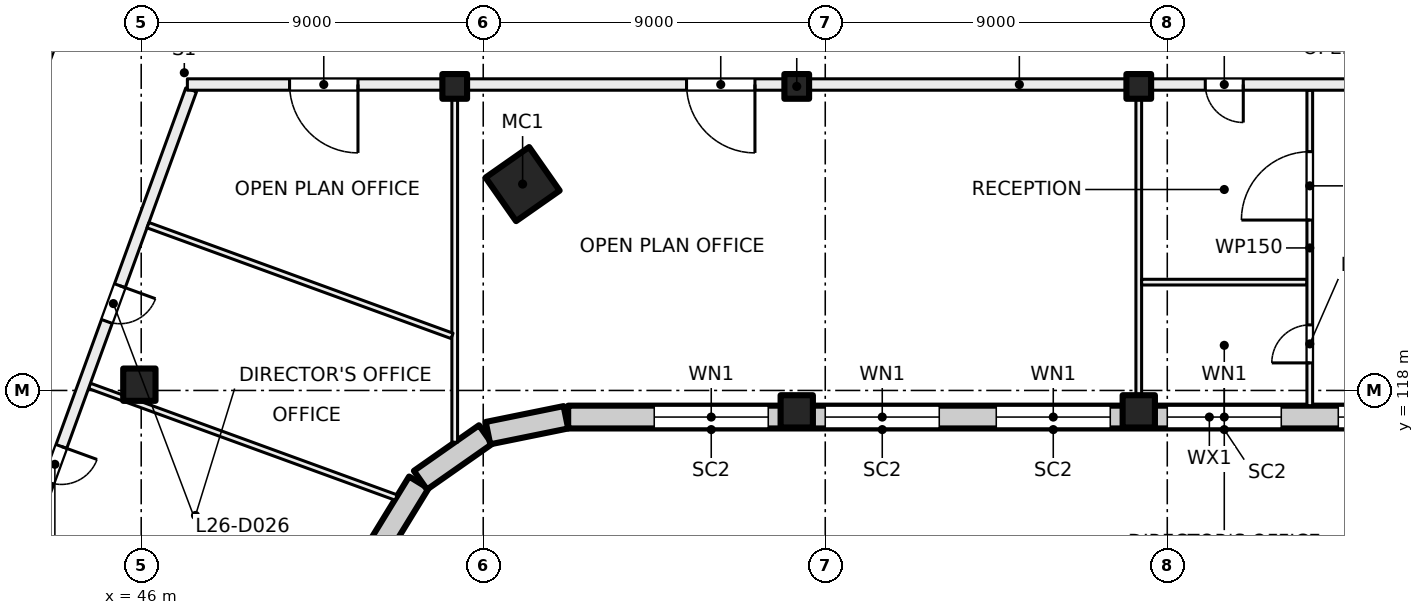
"""IFC4 building model, lengths in metres.
Left out: names, types, materials, properties, quantities, classifications, styles, units other than length and angle.
Written with IfcOpenShell. Run it as: python <this file> out.ifc"""

import sys

from ifc_helpers import new_model, si_unit, direction, frame, frame_2d, origin, origin_2d, place, context, subcontext, project, spatial, rectangle, hollow_rectangle, extrude, element, fill, save


model = new_model("IFC4")
c1 = context("Model", 3, precision=1e-05, world=origin(), true_north=direction((0.0, 1.0)))
c2 = subcontext(c1, "Body", "Model", "MODEL_VIEW")
j1 = project(units=[si_unit("LENGTHUNIT", "METRE"), si_unit("PLANEANGLEUNIT", "RADIAN")], contexts=[c1])
p1 = place(None, origin())
s1 = spatial("IfcSite", under=j1, at=p1, CompositionType="ELEMENT")
p2 = place(p1, origin())
s2 = spatial("IfcBuilding", under=s1, at=p2, CompositionType="ELEMENT")
p3 = place(p2, frame((0.0, 0.0, 113.0)))
s3 = spatial("IfcBuildingStorey", under=s2, at=p3, CompositionType="ELEMENT", Elevation=113.0)
p4 = place(p3, frame((56.036, 123.43, 0.0), z_axis=(0.0, 0.0, 1.0), x_axis=(0.573576436351, -0.819152044289, 0.0)))
e1 = element("IfcColumn", 1, at=p4, inside=s3, PredefinedType="COLUMN", context=c2, shape_type="SweptSolid", body=[
    extrude(hollow_rectangle(XDim=1.4, YDim=1.4, WallThickness=0.04, at=origin_2d()), origin(), (0.0, 0.0, 1.0), 4.0),
])
for number, where, z_axis, x_axis in (
    (2, (54.25, 126.0, 0.0), (0.0, 0.0, 1.0), (1.0, 0.0, 0.0)),
    (3, (63.25, 126.0, 0.0), (0.0, 0.0, 1.0), (1.0, 0.0, 0.0)),
    (4, (72.25, 126.0, 0.0), (0.0, 0.0, 1.0), (1.0, 0.0, 0.0)),
):
    element("IfcColumn", number, at=place(p3, frame(where, z_axis=z_axis, x_axis=x_axis)), inside=s3, PredefinedType="COLUMN", context=c2, shape_type="SweptSolid", body=[
        extrude(rectangle(XDim=0.65, YDim=0.65, at=origin_2d()), origin(), (0.0, 0.0, 1.0), 4.0),
    ])
for number, where, z_axis, x_axis in (
    (5, (45.952, 118.152, 0.0), (0.0, 0.0, 1.0), (1.0, 0.0, 0.0)),
    (6, (63.25, 117.45, 0.0), (0.0, 0.0, 1.0), (1.0, 0.0, 0.0)),
    (7, (72.25, 117.45, 0.0), (0.0, 0.0, 1.0), (1.0, 0.0, 0.0)),
):
    element("IfcColumn", number, at=place(p3, frame(where, z_axis=z_axis, x_axis=x_axis)), inside=s3, PredefinedType="COLUMN", context=c2, shape_type="SweptSolid", body=[
        extrude(rectangle(XDim=0.85, YDim=0.85, at=origin_2d()), origin(), (0.0, 0.0, 1.0), 4.0),
    ])
p5 = place(p3, frame((53.305, 115.578, 0.0), z_axis=(0.0, 0.0, 1.0), x_axis=(-0.522402266438, -0.852699168535, 0.0)))
e8 = element("IfcWall", 8, at=p5, inside=s3, PredefinedType="SOLIDWALL", context=c2, shape_type="SweptSolid", body=[
    extrude(rectangle(XDim=2.042, YDim=0.6, at=frame_2d((1.021, 0.0))), origin(), (0.0, 0.0, 1.0), 3.625),
])
for number, where, z_axis, x_axis in (
    (9, (55.062, 116.839, 0.0), (0.0, 0.0, 1.0), (-0.819, -0.574, 0.0)),
    (10, (57.175, 117.294, 0.0), (0.0, 0.0, 1.0), (-0.98, -0.199, 0.0)),
):
    element("IfcWall", number, at=place(p3, frame(where, z_axis=z_axis, x_axis=x_axis)), inside=s3, PredefinedType="SOLIDWALL", context=c2, shape_type="SweptSolid", body=[
        extrude(rectangle(XDim=2.092, YDim=0.6, at=frame_2d((1.046, 0.0))), origin(), (0.0, 0.0, 1.0), 3.625),
    ])
p6 = place(p3, frame((90.98, 117.3, 0.0), z_axis=(0.0, 0.0, 1.0), x_axis=(-1.0, 0.0, 0.0)))
e11 = element("IfcWall", 11, at=p6, inside=s3, PredefinedType="SOLIDWALL", context=c2, shape_type="SweptSolid", body=[
    extrude(rectangle(XDim=33.745, YDim=0.6, at=frame_2d((16.873, 0.0))), origin(), (0.0, 0.0, 1.0), 3.625),
])
p7 = place(p6, frame((1.48, 0.0, 0.9)))
e12 = element("IfcOpeningElement", 12, at=p7, cuts=e11, PredefinedType="OPENING", context=c2, shape_type="SweptSolid", body=[
    extrude(rectangle(XDim=3.0, YDim=2.4, at=frame_2d((1.5, 1.2))), frame((0.0, 0.31, 0.0), z_axis=(0.0, -1.0, 0.0), x_axis=(1.0, 0.0, 0.0)), (0.0, 0.0, 1.0), 0.62),
])
p8 = place(p6, frame((5.98, 0.0, 0.9)))
e13 = element("IfcOpeningElement", 13, at=p8, cuts=e11, PredefinedType="OPENING", context=c2, shape_type="SweptSolid", body=[
    extrude(rectangle(XDim=3.0, YDim=2.4, at=frame_2d((1.5, 1.2))), frame((0.0, 0.31, 0.0), z_axis=(0.0, -1.0, 0.0), x_axis=(1.0, 0.0, 0.0)), (0.0, 0.0, 1.0), 0.62),
])
p9 = place(p6, frame((10.48, 0.0, 0.9)))
e14 = element("IfcOpeningElement", 14, at=p9, cuts=e11, PredefinedType="OPENING", context=c2, shape_type="SweptSolid", body=[
    extrude(rectangle(XDim=3.0, YDim=2.4, at=frame_2d((1.5, 1.2))), frame((0.0, 0.31, 0.0), z_axis=(0.0, -1.0, 0.0), x_axis=(1.0, 0.0, 0.0)), (0.0, 0.0, 1.0), 0.62),
])
p10 = place(p6, frame((14.98, 0.0, 0.9)))
e15 = element("IfcOpeningElement", 15, at=p10, cuts=e11, PredefinedType="OPENING", context=c2, shape_type="SweptSolid", body=[
    extrude(rectangle(XDim=3.0, YDim=2.4, at=frame_2d((1.5, 1.2))), frame((0.0, 0.31, 0.0), z_axis=(0.0, -1.0, 0.0), x_axis=(1.0, 0.0, 0.0)), (0.0, 0.0, 1.0), 0.62),
])
p11 = place(p6, frame((19.48, 0.0, 0.9)))
e16 = element("IfcOpeningElement", 16, at=p11, cuts=e11, PredefinedType="OPENING", context=c2, shape_type="SweptSolid", body=[
    extrude(rectangle(XDim=3.0, YDim=2.4, at=frame_2d((1.5, 1.2))), frame((0.0, 0.31, 0.0), z_axis=(0.0, -1.0, 0.0), x_axis=(1.0, 0.0, 0.0)), (0.0, 0.0, 1.0), 0.62),
])
p12 = place(p6, frame((23.98, 0.0, 0.9)))
e17 = element("IfcOpeningElement", 17, at=p12, cuts=e11, PredefinedType="OPENING", context=c2, shape_type="SweptSolid", body=[
    extrude(rectangle(XDim=3.0, YDim=2.4, at=frame_2d((1.5, 1.2))), frame((0.0, 0.31, 0.0), z_axis=(0.0, -1.0, 0.0), x_axis=(1.0, 0.0, 0.0)), (0.0, 0.0, 1.0), 0.62),
])
p13 = place(p6, frame((28.48, 0.0, 0.9)))
e18 = element("IfcOpeningElement", 18, at=p13, cuts=e11, PredefinedType="OPENING", context=c2, shape_type="SweptSolid", body=[
    extrude(rectangle(XDim=3.0, YDim=2.4, at=frame_2d((1.5, 1.2))), frame((0.0, 0.31, 0.0), z_axis=(0.0, -1.0, 0.0), x_axis=(1.0, 0.0, 0.0)), (0.0, 0.0, 1.0), 0.62),
])
p14 = place(p3, frame((32.881, 97.657, 0.0), z_axis=(0.0, 0.0, 1.0), x_axis=(0.342017360004, 0.939693633828, 0.0)))
e19 = element("IfcWall", 19, at=p14, inside=s3, PredefinedType="PARTITIONING", context=c2, shape_type="SweptSolid", body=[
    extrude(rectangle(XDim=34.516, YDim=0.3, at=frame_2d((17.258, 0.0))), origin(), (0.0, 0.0, 1.0), 3.625),
])
p15 = place(p14, frame((2.025, 0.0, 0.0)))
e20 = element("IfcOpeningElement", 20, at=p15, cuts=e19, PredefinedType="OPENING", context=c2, shape_type="SweptSolid", body=[
    extrude(rectangle(XDim=1.2, YDim=2.1, at=frame_2d((0.6, 1.05))), frame((0.0, 0.16, 0.0), z_axis=(0.0, -1.0, 0.0), x_axis=(1.0, 0.0, 0.0)), (0.0, 0.0, 1.0), 0.32),
])
p16 = place(p14, frame((7.0, 0.0, 0.0)))
e21 = element("IfcOpeningElement", 21, at=p16, cuts=e19, PredefinedType="OPENING", context=c2, shape_type="SweptSolid", body=[
    extrude(rectangle(XDim=1.0, YDim=2.1, at=frame_2d((0.5, 1.05))), frame((0.0, 0.16, 0.0), z_axis=(0.0, -1.0, 0.0), x_axis=(1.0, 0.0, 0.0)), (0.0, 0.0, 1.0), 0.32),
])
p17 = place(p14, frame((11.5, 0.0, 0.0)))
e22 = element("IfcOpeningElement", 22, at=p17, cuts=e19, PredefinedType="OPENING", context=c2, shape_type="SweptSolid", body=[
    extrude(rectangle(XDim=1.0, YDim=2.1, at=frame_2d((0.5, 1.05))), frame((0.0, 0.16, 0.0), z_axis=(0.0, -1.0, 0.0), x_axis=(1.0, 0.0, 0.0)), (0.0, 0.0, 1.0), 0.32),
])
p18 = place(p14, frame((16.0, 0.0, 0.0)))
e23 = element("IfcOpeningElement", 23, at=p18, cuts=e19, PredefinedType="OPENING", context=c2, shape_type="SweptSolid", body=[
    extrude(rectangle(XDim=1.0, YDim=2.1, at=frame_2d((0.5, 1.05))), frame((0.0, 0.16, 0.0), z_axis=(0.0, -1.0, 0.0), x_axis=(1.0, 0.0, 0.0)), (0.0, 0.0, 1.0), 0.32),
])
p19 = place(p14, frame((20.5, 0.0, 0.0)))
e24 = element("IfcOpeningElement", 24, at=p19, cuts=e19, PredefinedType="OPENING", context=c2, shape_type="SweptSolid", body=[
    extrude(rectangle(XDim=1.0, YDim=2.1, at=frame_2d((0.5, 1.05))), frame((0.0, 0.16, 0.0), z_axis=(0.0, -1.0, 0.0), x_axis=(1.0, 0.0, 0.0)), (0.0, 0.0, 1.0), 0.32),
])
p20 = place(p14, frame((25.0, 0.0, 0.0)))
e25 = element("IfcOpeningElement", 25, at=p20, cuts=e19, PredefinedType="OPENING", context=c2, shape_type="SweptSolid", body=[
    extrude(rectangle(XDim=1.0, YDim=2.1, at=frame_2d((0.5, 1.05))), frame((0.0, 0.16, 0.0), z_axis=(0.0, -1.0, 0.0), x_axis=(1.0, 0.0, 0.0)), (0.0, 0.0, 1.0), 0.32),
])
p21 = place(p14, frame((29.779, 0.0, 0.0)))
e26 = element("IfcOpeningElement", 26, at=p21, cuts=e19, PredefinedType="OPENING", context=c2, shape_type="SweptSolid", body=[
    extrude(rectangle(XDim=1.8, YDim=2.1, at=frame_2d((0.9, 1.05))), frame((0.0, 0.16, 0.0), z_axis=(0.0, -1.0, 0.0), x_axis=(1.0, 0.0, 0.0)), (0.0, 0.0, 1.0), 0.32),
])
p22 = place(p3, frame((44.639, 118.12, 0.0), z_axis=(0.0, 0.0, 1.0), x_axis=(0.939669707102, -0.342083091593, 0.0)))
e27 = element("IfcWall", 27, at=p22, inside=s3, PredefinedType="PARTITIONING", context=c2, shape_type="SweptSolid", body=[
    extrude(rectangle(XDim=8.589, YDim=0.15, at=frame_2d((4.295, 0.0))), origin(), (0.0, 0.0, 1.0), 3.625),
])
p23 = place(p3, frame((47.314, 125.909, 0.0), z_axis=(0.0, 0.0, 1.0), x_axis=(-0.342010770371, -0.939696032209, 0.0)))
e28 = element("IfcWall", 28, at=p23, inside=s3, PredefinedType="PARTITIONING", context=c2, shape_type="SweptSolid", body=[
    extrude(rectangle(XDim=31.485, YDim=0.3, at=frame_2d((15.742, 0.0))), origin(), (0.0, 0.0, 1.0), 3.625),
])
p24 = place(p23, frame((28.259, 0.0, 0.0)))
e29 = element("IfcOpeningElement", 29, at=p24, cuts=e28, PredefinedType="OPENING", context=c2, shape_type="SweptSolid", body=[
    extrude(rectangle(XDim=1.2, YDim=2.1, at=frame_2d((0.6, 1.05))), frame((0.0, 0.16, 0.0), z_axis=(0.0, -1.0, 0.0), x_axis=(1.0, 0.0, 0.0)), (0.0, 0.0, 1.0), 0.32),
])
p25 = place(p23, frame((18.584, 0.0, 0.0)))
e30 = element("IfcOpeningElement", 30, at=p25, cuts=e28, PredefinedType="OPENING", context=c2, shape_type="SweptSolid", body=[
    extrude(rectangle(XDim=1.8, YDim=2.1, at=frame_2d((0.9, 1.05))), frame((0.0, 0.16, 0.0), z_axis=(0.0, -1.0, 0.0), x_axis=(1.0, 0.0, 0.0)), (0.0, 0.0, 1.0), 0.32),
])
p26 = place(p23, frame((9.985, 0.0, 0.0)))
e31 = element("IfcOpeningElement", 31, at=p26, cuts=e28, PredefinedType="OPENING", context=c2, shape_type="SweptSolid", body=[
    extrude(rectangle(XDim=1.0, YDim=2.1, at=frame_2d((0.5, 1.05))), frame((0.0, 0.16, 0.0), z_axis=(0.0, -1.0, 0.0), x_axis=(1.0, 0.0, 0.0)), (0.0, 0.0, 1.0), 0.32),
])
p27 = place(p23, frame((5.484, 0.0, 0.0)))
e32 = element("IfcOpeningElement", 32, at=p27, cuts=e28, PredefinedType="OPENING", context=c2, shape_type="SweptSolid", body=[
    extrude(rectangle(XDim=1.0, YDim=2.1, at=frame_2d((0.5, 1.05))), frame((0.0, 0.16, 0.0), z_axis=(0.0, -1.0, 0.0), x_axis=(1.0, 0.0, 0.0)), (0.0, 0.0, 1.0), 0.32),
])
p28 = place(p3, frame((54.25, 116.637, 0.0), z_axis=(0.0, 0.0, 1.0), x_axis=(0.0, 1.0, 0.0)))
e33 = element("IfcWall", 33, at=p28, inside=s3, PredefinedType="PARTITIONING", context=c2, shape_type="SweptSolid", body=[
    extrude(rectangle(XDim=9.263, YDim=0.15, at=frame_2d((4.631, 0.0))), origin(), (0.0, 0.0, 1.0), 3.625),
])
p29 = place(p3, frame((54.18, 119.436, 0.0), z_axis=(0.0, 0.0, 1.0), x_axis=(-0.939669476286, 0.342083725624, 0.0)))
e34 = element("IfcWall", 34, at=p29, inside=s3, PredefinedType="PARTITIONING", context=c2, shape_type="SweptSolid", body=[
    extrude(rectangle(XDim=8.516, YDim=0.15, at=frame_2d((4.258, 0.0))), origin(), (0.0, 0.0, 1.0), 3.625),
])
p30 = place(p3, frame((72.25, 117.6, 0.0), z_axis=(0.0, 0.0, 1.0), x_axis=(0.0, 1.0, 0.0)))
e35 = element("IfcWall", 35, at=p30, inside=s3, PredefinedType="PARTITIONING", context=c2, shape_type="SweptSolid", body=[
    extrude(rectangle(XDim=8.3, YDim=0.15, at=frame_2d((4.15, 0.0))), origin(), (0.0, 0.0, 1.0), 3.625),
])
p31 = place(p3, frame((72.325, 120.85, 0.0), z_axis=(0.0, 0.0, 1.0), x_axis=(1.0, 0.0, 0.0)))
e36 = element("IfcWall", 36, at=p31, inside=s3, PredefinedType="PARTITIONING", context=c2, shape_type="SweptSolid", body=[
    extrude(rectangle(XDim=4.35, YDim=0.15, at=frame_2d((2.175, 0.0))), origin(), (0.0, 0.0, 1.0), 3.625),
])
p32 = place(p3, frame((76.75, 117.6, 0.0), z_axis=(0.0, 0.0, 1.0), x_axis=(0.0, 1.0, 0.0)))
e37 = element("IfcWall", 37, at=p32, inside=s3, PredefinedType="PARTITIONING", context=c2, shape_type="SweptSolid", body=[
    extrude(rectangle(XDim=8.3, YDim=0.15, at=frame_2d((4.15, 0.0))), origin(), (0.0, 0.0, 1.0), 3.625),
])
p33 = place(p32, frame((1.125, 0.0, 0.0)))
e38 = element("IfcOpeningElement", 38, at=p33, cuts=e37, PredefinedType="OPENING", context=c2, shape_type="SweptSolid", body=[
    extrude(rectangle(XDim=1.0, YDim=2.1, at=frame_2d((0.5, 1.05))), frame((0.0, 0.085, 0.0), z_axis=(0.0, -1.0, 0.0), x_axis=(1.0, 0.0, 0.0)), (0.0, 0.0, 1.0), 0.17),
])
p34 = place(p32, frame((4.884, 0.0, 0.0)))
e39 = element("IfcOpeningElement", 39, at=p34, cuts=e37, PredefinedType="OPENING", context=c2, shape_type="SweptSolid", body=[
    extrude(rectangle(XDim=1.8, YDim=2.1, at=frame_2d((0.9, 1.05))), frame((0.0, 0.085, 0.0), z_axis=(0.0, -1.0, 0.0), x_axis=(1.0, 0.0, 0.0)), (0.0, 0.0, 1.0), 0.17),
])
p35 = place(p3, frame((91.0, 126.05, 0.0), z_axis=(0.0, 0.0, 1.0), x_axis=(-1.0, 0.0, 0.0)))
e40 = element("IfcWall", 40, at=p35, inside=s3, PredefinedType="PARTITIONING", context=c2, shape_type="SweptSolid", body=[
    extrude(rectangle(XDim=43.785, YDim=0.3, at=frame_2d((21.893, 0.0))), origin(), (0.0, 0.0, 1.0), 3.625),
])
p36 = place(p35, frame((2.025, 0.0, 0.0)))
e41 = element("IfcOpeningElement", 41, at=p36, cuts=e40, PredefinedType="OPENING", context=c2, shape_type="SweptSolid", body=[
    extrude(rectangle(XDim=1.2, YDim=2.1, at=frame_2d((0.6, 1.05))), frame((0.0, 0.16, 0.0), z_axis=(0.0, -1.0, 0.0), x_axis=(1.0, 0.0, 0.0)), (0.0, 0.0, 1.0), 0.32),
])
p37 = place(p35, frame((7.0, 0.0, 0.0)))
e42 = element("IfcOpeningElement", 42, at=p37, cuts=e40, PredefinedType="OPENING", context=c2, shape_type="SweptSolid", body=[
    extrude(rectangle(XDim=1.0, YDim=2.1, at=frame_2d((0.5, 1.05))), frame((0.0, 0.16, 0.0), z_axis=(0.0, -1.0, 0.0), x_axis=(1.0, 0.0, 0.0)), (0.0, 0.0, 1.0), 0.32),
])
p38 = place(p35, frame((16.0, 0.0, 0.0)))
e43 = element("IfcOpeningElement", 43, at=p38, cuts=e40, PredefinedType="OPENING", context=c2, shape_type="SweptSolid", body=[
    extrude(rectangle(XDim=1.0, YDim=2.1, at=frame_2d((0.5, 1.05))), frame((0.0, 0.16, 0.0), z_axis=(0.0, -1.0, 0.0), x_axis=(1.0, 0.0, 0.0)), (0.0, 0.0, 1.0), 0.32),
])
p39 = place(p35, frame((28.85, 0.0, 0.0)))
e44 = element("IfcOpeningElement", 44, at=p39, cuts=e40, PredefinedType="OPENING", context=c2, shape_type="SweptSolid", body=[
    extrude(rectangle(XDim=1.8, YDim=2.1, at=frame_2d((0.9, 1.05))), frame((0.0, 0.16, 0.0), z_axis=(0.0, -1.0, 0.0), x_axis=(1.0, 0.0, 0.0)), (0.0, 0.0, 1.0), 0.32),
])
p40 = place(p35, frame((39.296, 0.0, 0.0)))
e45 = element("IfcOpeningElement", 45, at=p40, cuts=e40, PredefinedType="OPENING", context=c2, shape_type="SweptSolid", body=[
    extrude(rectangle(XDim=1.8, YDim=2.1, at=frame_2d((0.9, 1.05))), frame((0.0, 0.16, 0.0), z_axis=(0.0, -1.0, 0.0), x_axis=(1.0, 0.0, 0.0)), (0.0, 0.0, 1.0), 0.32),
])
p41 = place(p9, origin())
e46 = element("IfcWindow", 46, at=p41, inside=s3, PartitioningType="SINGLE_PANEL", PredefinedType="WINDOW", context=c2, shape_type="SweptSolid", body=[
    extrude(rectangle(XDim=3.0, YDim=2.4, at=frame_2d((1.5, 1.2))), frame((0.0, 0.03, 0.0), z_axis=(0.0, -1.0, 0.0), x_axis=(1.0, 0.0, 0.0)), (0.0, 0.0, 1.0), 0.06),
])
fill(e14, e46)
p42 = place(p10, origin())
e47 = element("IfcWindow", 47, at=p42, inside=s3, PartitioningType="SINGLE_PANEL", PredefinedType="WINDOW", context=c2, shape_type="SweptSolid", body=[
    extrude(rectangle(XDim=3.0, YDim=2.4, at=frame_2d((1.5, 1.2))), frame((0.0, 0.03, 0.0), z_axis=(0.0, -1.0, 0.0), x_axis=(1.0, 0.0, 0.0)), (0.0, 0.0, 1.0), 0.06),
])
fill(e15, e47)
p43 = place(p11, origin())
e48 = element("IfcWindow", 48, at=p43, inside=s3, PartitioningType="SINGLE_PANEL", PredefinedType="WINDOW", context=c2, shape_type="SweptSolid", body=[
    extrude(rectangle(XDim=3.0, YDim=2.4, at=frame_2d((1.5, 1.2))), frame((0.0, 0.03, 0.0), z_axis=(0.0, -1.0, 0.0), x_axis=(1.0, 0.0, 0.0)), (0.0, 0.0, 1.0), 0.06),
])
fill(e16, e48)
p44 = place(p12, origin())
e49 = element("IfcWindow", 49, at=p44, inside=s3, PartitioningType="SINGLE_PANEL", PredefinedType="WINDOW", context=c2, shape_type="SweptSolid", body=[
    extrude(rectangle(XDim=3.0, YDim=2.4, at=frame_2d((1.5, 1.2))), frame((0.0, 0.03, 0.0), z_axis=(0.0, -1.0, 0.0), x_axis=(1.0, 0.0, 0.0)), (0.0, 0.0, 1.0), 0.06),
])
fill(e17, e49)
p45 = place(p13, origin())
e50 = element("IfcWindow", 50, at=p45, inside=s3, PartitioningType="SINGLE_PANEL", PredefinedType="WINDOW", context=c2, shape_type="SweptSolid", body=[
    extrude(rectangle(XDim=3.0, YDim=2.4, at=frame_2d((1.5, 1.2))), frame((0.0, 0.03, 0.0), z_axis=(0.0, -1.0, 0.0), x_axis=(1.0, 0.0, 0.0)), (0.0, 0.0, 1.0), 0.06),
])
fill(e18, e50)
p46 = place(p38, origin())
e51 = element("IfcDoor", 51, at=p46, inside=s3, OperationType="SINGLE_SWING_LEFT", PredefinedType="DOOR", context=c2, shape_type="SweptSolid", body=[
    extrude(rectangle(XDim=1.0, YDim=2.1, at=frame_2d((0.5, 1.05))), frame((0.0, 0.025, 0.0), z_axis=(0.0, -1.0, 0.0), x_axis=(1.0, 0.0, 0.0)), (0.0, 0.0, 1.0), 0.05),
])
fill(e43, e51)
p47 = place(p33, origin())
e52 = element("IfcDoor", 52, at=p47, inside=s3, OperationType="SINGLE_SWING_RIGHT", PredefinedType="DOOR", context=c2, shape_type="SweptSolid", body=[
    extrude(rectangle(XDim=1.0, YDim=2.1, at=frame_2d((0.5, 1.05))), frame((0.0, 0.025, 0.0), z_axis=(0.0, -1.0, 0.0), x_axis=(1.0, 0.0, 0.0)), (0.0, 0.0, 1.0), 0.05),
])
fill(e38, e52)
p48 = place(p34, origin())
e53 = element("IfcDoor", 53, at=p48, inside=s3, OperationType="DOUBLE_DOOR_SINGLE_SWING", PredefinedType="DOOR", context=c2, shape_type="SweptSolid", body=[
    extrude(rectangle(XDim=1.8, YDim=2.1, at=frame_2d((0.9, 1.05))), frame((0.0, 0.025, 0.0), z_axis=(0.0, -1.0, 0.0), x_axis=(1.0, 0.0, 0.0)), (0.0, 0.0, 1.0), 0.05),
])
fill(e39, e53)
p49 = place(p39, origin())
e54 = element("IfcDoor", 54, at=p49, inside=s3, OperationType="DOUBLE_DOOR_SINGLE_SWING", PredefinedType="DOOR", context=c2, shape_type="SweptSolid", body=[
    extrude(rectangle(XDim=1.8, YDim=2.1, at=frame_2d((0.9, 1.05))), frame((0.0, 0.025, 0.0), z_axis=(0.0, -1.0, 0.0), x_axis=(1.0, 0.0, 0.0)), (0.0, 0.0, 1.0), 0.05),
])
fill(e44, e54)
p50 = place(p26, origin())
e55 = element("IfcDoor", 55, at=p50, inside=s3, OperationType="SINGLE_SWING_LEFT", PredefinedType="DOOR", context=c2, shape_type="SweptSolid", body=[
    extrude(rectangle(XDim=1.0, YDim=2.1, at=frame_2d((0.5, 1.05))), frame((0.0, 0.025, 0.0), z_axis=(0.0, -1.0, 0.0), x_axis=(1.0, 0.0, 0.0)), (0.0, 0.0, 1.0), 0.05),
])
fill(e31, e55)
p51 = place(p27, origin())
e56 = element("IfcDoor", 56, at=p51, inside=s3, OperationType="SINGLE_SWING_LEFT", PredefinedType="DOOR", context=c2, shape_type="SweptSolid", body=[
    extrude(rectangle(XDim=1.0, YDim=2.1, at=frame_2d((0.5, 1.05))), frame((0.0, 0.025, 0.0), z_axis=(0.0, -1.0, 0.0), x_axis=(1.0, 0.0, 0.0)), (0.0, 0.0, 1.0), 0.05),
])
fill(e32, e56)
p52 = place(p21, origin())
e57 = element("IfcDoor", 57, at=p52, inside=s3, OperationType="DOUBLE_DOOR_SINGLE_SWING", PredefinedType="DOOR", context=c2, shape_type="SweptSolid", body=[
    extrude(rectangle(XDim=1.8, YDim=2.1, at=frame_2d((0.9, 1.05))), frame((0.0, 0.025, 0.0), z_axis=(0.0, -1.0, 0.0), x_axis=(1.0, 0.0, 0.0)), (0.0, 0.0, 1.0), 0.05),
])
fill(e26, e57)
p53 = place(p40, origin())
e58 = element("IfcDoor", 58, at=p53, inside=s3, OperationType="DOUBLE_DOOR_SINGLE_SWING", PredefinedType="DOOR", context=c2, shape_type="SweptSolid", body=[
    extrude(rectangle(XDim=1.8, YDim=2.1, at=frame_2d((0.9, 1.05))), frame((0.0, 0.025, 0.0), z_axis=(0.0, -1.0, 0.0), x_axis=(1.0, 0.0, 0.0)), (0.0, 0.0, 1.0), 0.05),
])
fill(e45, e58)
save(model, sys.argv[1])
